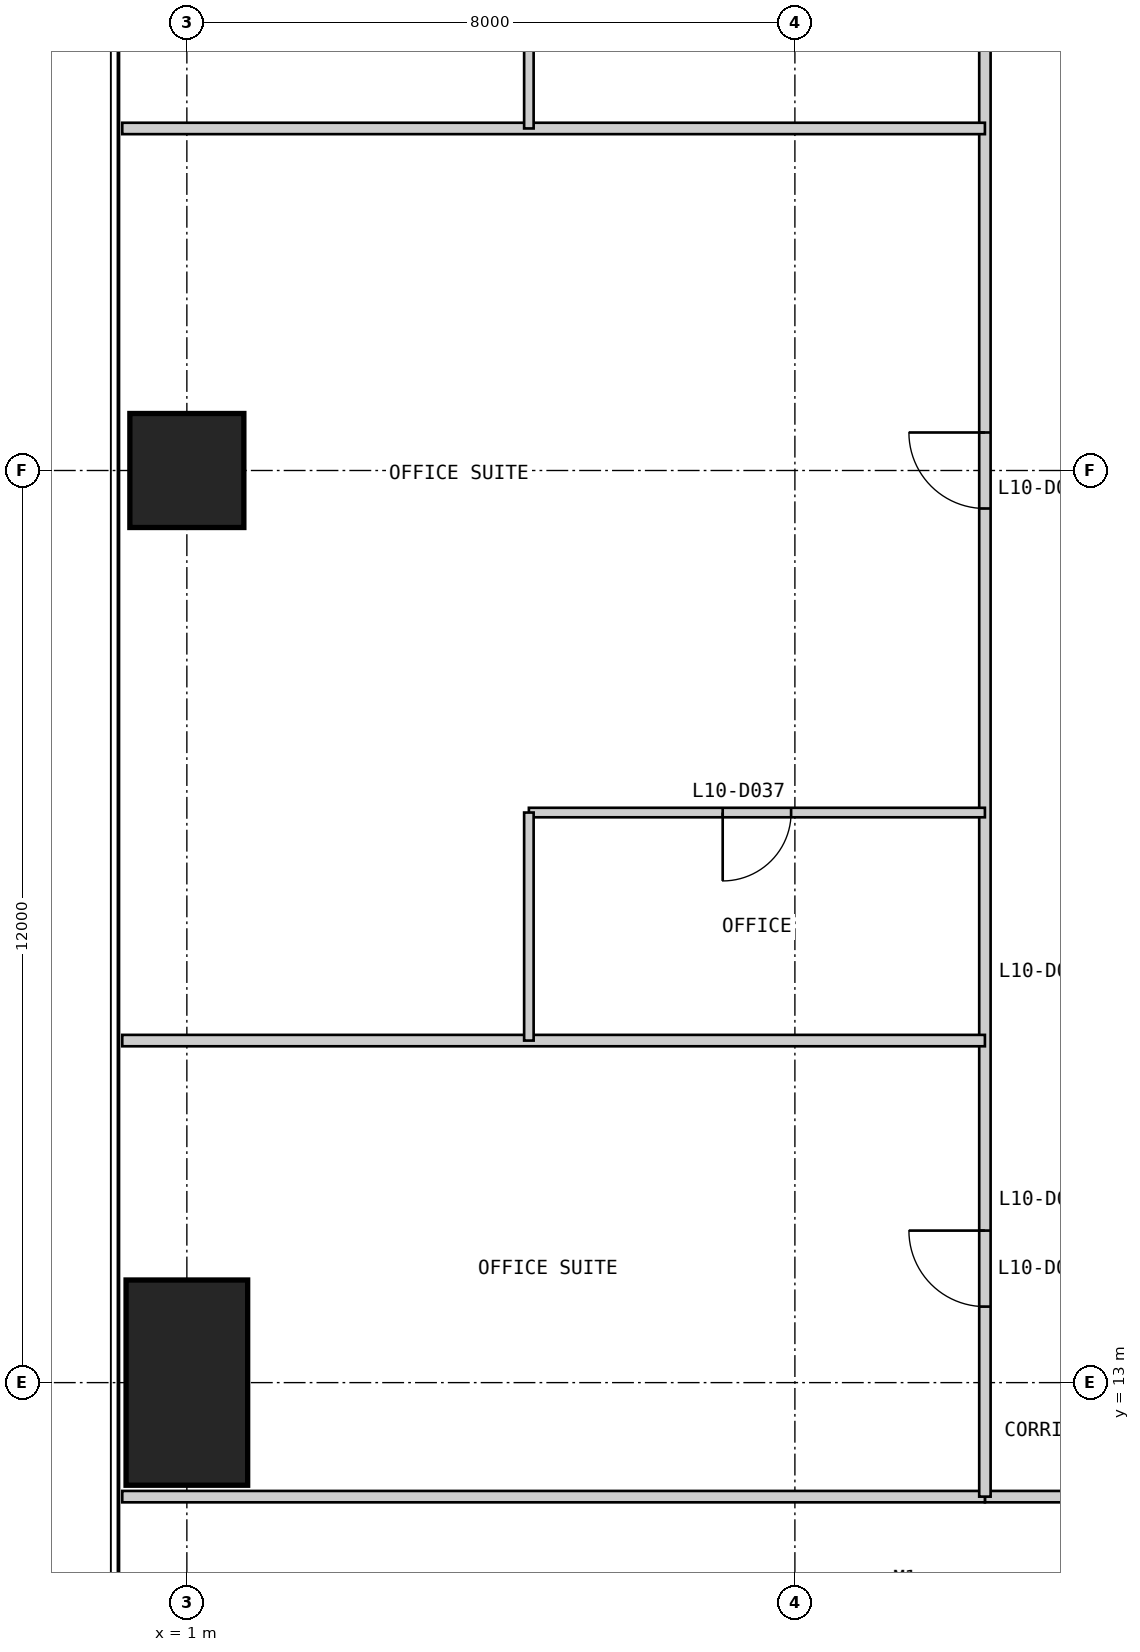
"""IFC4 building model, lengths in metres.
Left out: names, types, materials, properties, quantities, classifications, styles, units other than length and angle.
Written with IfcOpenShell. Run it as: python <this file> out.ifc"""

import sys

from ifc_helpers import new_model, si_unit, direction, frame, frame_2d, origin, origin_2d, place, context, subcontext, project, spatial, rectangle, extrude, element, fill, save


model = new_model("IFC4")
c1 = context("Model", 3, precision=1e-05, world=origin(), true_north=direction((0.0, 1.0)))
c2 = subcontext(c1, "Body", "Model", "MODEL_VIEW")
j1 = project(units=[si_unit("LENGTHUNIT", "METRE"), si_unit("PLANEANGLEUNIT", "RADIAN")], contexts=[c1])
p1 = place(None, origin())
s1 = spatial("IfcSite", under=j1, at=p1, CompositionType="ELEMENT")
p2 = place(p1, origin())
s2 = spatial("IfcBuilding", under=s1, at=p2, CompositionType="ELEMENT")
p3 = place(p2, frame((0.0, 0.0, 47.0)))
s3 = spatial("IfcBuildingStorey", under=s2, at=p3, CompositionType="ELEMENT", Elevation=47.0)
p4 = place(p3, frame((1.0, 25.0, 0.0), z_axis=(0.0, 0.0, 1.0), x_axis=(1.0, 0.0, 0.0)))
e1 = element("IfcColumn", 1, at=p4, inside=s3, PredefinedType="COLUMN", context=c2, shape_type="SweptSolid", body=[
    extrude(rectangle(XDim=1.5, YDim=1.5, at=origin_2d()), origin(), (0.0, 0.0, 1.0), 4.0),
])
p5 = place(p3, frame((1.0, 13.0, 0.0), z_axis=(0.0, 0.0, 1.0), x_axis=(1.0, 0.0, 0.0)))
e2 = element("IfcColumn", 2, at=p5, inside=s3, PredefinedType="COLUMN", context=c2, shape_type="SweptSolid", body=[
    extrude(rectangle(XDim=1.6, YDim=2.7, at=origin_2d()), origin(), (0.0, 0.0, 1.0), 4.0),
])
p6 = place(p3, frame((11.5, 11.5, 0.0), z_axis=(0.0, 0.0, 1.0), x_axis=(1.0, 0.0, 0.0)))
e3 = element("IfcWall", 3, at=p6, inside=s3, PredefinedType="PARTITIONING", context=c2, shape_type="SweptSolid", body=[
    extrude(rectangle(XDim=27.0, YDim=0.15, at=frame_2d((13.5, 0.0))), origin(), (0.0, 0.0, 1.0), 3.85),
])
p7 = place(p6, frame((2.5, 0.0, 0.0)))
e4 = element("IfcOpeningElement", 4, at=p7, cuts=e3, PredefinedType="OPENING", context=c2, shape_type="SweptSolid", body=[
    extrude(rectangle(XDim=1.0, YDim=2.2, at=frame_2d((0.5, 1.1))), frame((0.0, 0.085, 0.0), z_axis=(0.0, -1.0, 0.0), x_axis=(1.0, 0.0, 0.0)), (0.0, 0.0, 1.0), 0.17),
])
p8 = place(p6, frame((16.0, 0.0, 0.0)))
e5 = element("IfcOpeningElement", 5, at=p8, cuts=e3, PredefinedType="OPENING", context=c2, shape_type="SweptSolid", body=[
    extrude(rectangle(XDim=1.0, YDim=2.2, at=frame_2d((0.5, 1.1))), frame((0.0, 0.085, 0.0), z_axis=(0.0, -1.0, 0.0), x_axis=(1.0, 0.0, 0.0)), (0.0, 0.0, 1.0), 0.17),
])
p9 = place(p3, frame((0.15, 11.5, 0.0), z_axis=(0.0, 0.0, 1.0), x_axis=(1.0, 0.0, 0.0)))
e6 = element("IfcWall", 6, at=p9, inside=s3, PredefinedType="PARTITIONING", context=c2, shape_type="SweptSolid", body=[
    extrude(rectangle(XDim=11.35, YDim=0.15, at=frame_2d((5.675, 0.0))), origin(), (0.0, 0.0, 1.0), 3.85),
])
p10 = place(p3, frame((11.5, 38.5, 0.0), z_axis=(0.0, 0.0, 1.0), x_axis=(0.0, -1.0, 0.0)))
e7 = element("IfcWall", 7, at=p10, inside=s3, PredefinedType="PARTITIONING", context=c2, shape_type="SweptSolid", body=[
    extrude(rectangle(XDim=27.0, YDim=0.15, at=frame_2d((13.5, 0.0))), origin(), (0.0, 0.0, 1.0), 3.85),
])
p11 = place(p10, frame((2.5, 0.0, 0.0)))
e8 = element("IfcOpeningElement", 8, at=p11, cuts=e7, PredefinedType="OPENING", context=c2, shape_type="SweptSolid", body=[
    extrude(rectangle(XDim=1.0, YDim=2.2, at=frame_2d((0.5, 1.1))), frame((0.0, 0.085, 0.0), z_axis=(0.0, -1.0, 0.0), x_axis=(1.0, 0.0, 0.0)), (0.0, 0.0, 1.0), 0.17),
])
p12 = place(p10, frame((13.0, 0.0, 0.0)))
e9 = element("IfcOpeningElement", 9, at=p12, cuts=e7, PredefinedType="OPENING", context=c2, shape_type="SweptSolid", body=[
    extrude(rectangle(XDim=1.0, YDim=2.2, at=frame_2d((0.5, 1.1))), frame((0.0, 0.085, 0.0), z_axis=(0.0, -1.0, 0.0), x_axis=(1.0, 0.0, 0.0)), (0.0, 0.0, 1.0), 0.17),
])
p13 = place(p10, frame((23.5, 0.0, 0.0)))
e10 = element("IfcOpeningElement", 10, at=p13, cuts=e7, PredefinedType="OPENING", context=c2, shape_type="SweptSolid", body=[
    extrude(rectangle(XDim=1.0, YDim=2.2, at=frame_2d((0.5, 1.1))), frame((0.0, 0.085, 0.0), z_axis=(0.0, -1.0, 0.0), x_axis=(1.0, 0.0, 0.0)), (0.0, 0.0, 1.0), 0.17),
])
p14 = place(p3, frame((0.15, 29.5, 0.0), z_axis=(0.0, 0.0, 1.0), x_axis=(1.0, 0.0, 0.0)))
e11 = element("IfcWall", 11, at=p14, inside=s3, PredefinedType="PARTITIONING", context=c2, shape_type="SweptSolid", body=[
    extrude(rectangle(XDim=11.35, YDim=0.15, at=frame_2d((5.675, 0.0))), origin(), (0.0, 0.0, 1.0), 3.85),
])
p15 = place(p3, frame((5.5, 20.5, 0.0), z_axis=(0.0, 0.0, 1.0), x_axis=(1.0, 0.0, 0.0)))
e12 = element("IfcWall", 12, at=p15, inside=s3, PredefinedType="PARTITIONING", context=c2, shape_type="SweptSolid", body=[
    extrude(rectangle(XDim=6.0, YDim=0.125, at=frame_2d((3.0, 0.0))), origin(), (0.0, 0.0, 1.0), 3.85),
])
p16 = place(p15, frame((2.55, 0.0, 0.0)))
e13 = element("IfcOpeningElement", 13, at=p16, cuts=e12, PredefinedType="OPENING", context=c2, shape_type="SweptSolid", body=[
    extrude(rectangle(XDim=0.9, YDim=2.2, at=frame_2d((0.45, 1.1))), frame((0.0, 0.073, 0.0), z_axis=(0.0, -1.0, 0.0), x_axis=(1.0, 0.0, 0.0)), (0.0, 0.0, 1.0), 0.145),
])
p17 = place(p3, frame((0.15, 17.5, 0.0), z_axis=(0.0, 0.0, 1.0), x_axis=(1.0, 0.0, 0.0)))
e14 = element("IfcWall", 14, at=p17, inside=s3, PredefinedType="PARTITIONING", context=c2, shape_type="SweptSolid", body=[
    extrude(rectangle(XDim=11.35, YDim=0.15, at=frame_2d((5.675, 0.0))), origin(), (0.0, 0.0, 1.0), 3.85),
])
p18 = place(p3, frame((5.5, 35.5, 0.0), z_axis=(0.0, 0.0, 1.0), x_axis=(0.0, -1.0, 0.0)))
e15 = element("IfcWall", 15, at=p18, inside=s3, PredefinedType="PARTITIONING", context=c2, shape_type="SweptSolid", body=[
    extrude(rectangle(XDim=6.0, YDim=0.125, at=frame_2d((3.0, 0.0))), origin(), (0.0, 0.0, 1.0), 3.85),
])
p19 = place(p3, frame((5.5, 20.5, 0.0), z_axis=(0.0, 0.0, 1.0), x_axis=(0.0, -1.0, 0.0)))
e16 = element("IfcWall", 16, at=p19, inside=s3, PredefinedType="PARTITIONING", context=c2, shape_type="SweptSolid", body=[
    extrude(rectangle(XDim=3.0, YDim=0.125, at=frame_2d((1.5, 0.0))), origin(), (0.0, 0.0, 1.0), 3.85),
])
p20 = place(p12, frame((1.0, 0.0, 0.0), z_axis=(0.0, 0.0, 1.0), x_axis=(-1.0, 0.0, 0.0)))
e17 = element("IfcDoor", 17, at=p20, inside=s3, OperationType="SINGLE_SWING_RIGHT", PredefinedType="DOOR", context=c2, shape_type="SweptSolid", body=[
    extrude(rectangle(XDim=1.0, YDim=2.2, at=frame_2d((0.5, 1.1))), frame((0.0, 0.025, 0.0), z_axis=(0.0, -1.0, 0.0), x_axis=(1.0, 0.0, 0.0)), (0.0, 0.0, 1.0), 0.05),
])
fill(e9, e17)
p21 = place(p16, frame((0.9, 0.0, 0.0), z_axis=(0.0, 0.0, 1.0), x_axis=(-1.0, 0.0, 0.0)))
e18 = element("IfcDoor", 18, at=p21, inside=s3, OperationType="SINGLE_SWING_RIGHT", PredefinedType="DOOR", context=c2, shape_type="SweptSolid", body=[
    extrude(rectangle(XDim=0.9, YDim=2.2, at=frame_2d((0.45, 1.1))), frame((0.0, 0.025, 0.0), z_axis=(0.0, -1.0, 0.0), x_axis=(1.0, 0.0, 0.0)), (0.0, 0.0, 1.0), 0.05),
])
fill(e13, e18)
p22 = place(p13, frame((1.0, 0.0, 0.0), z_axis=(0.0, 0.0, 1.0), x_axis=(-1.0, 0.0, 0.0)))
e19 = element("IfcDoor", 19, at=p22, inside=s3, OperationType="SINGLE_SWING_RIGHT", PredefinedType="DOOR", context=c2, shape_type="SweptSolid", body=[
    extrude(rectangle(XDim=1.0, YDim=2.2, at=frame_2d((0.5, 1.1))), frame((0.0, 0.025, 0.0), z_axis=(0.0, -1.0, 0.0), x_axis=(1.0, 0.0, 0.0)), (0.0, 0.0, 1.0), 0.05),
])
fill(e10, e19)
save(model, sys.argv[1])
